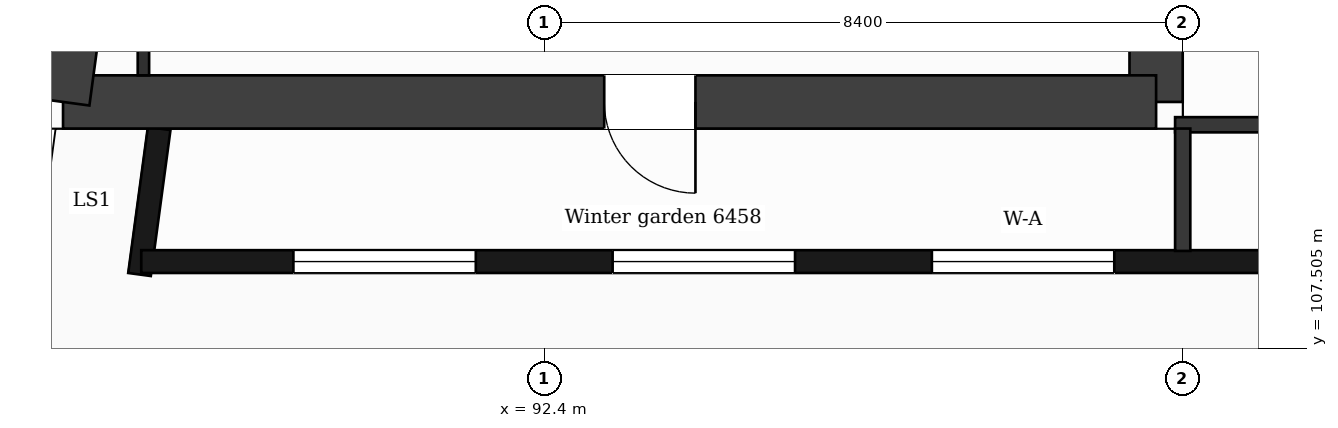
"""IFC4 building model, lengths in metres.
Left out: names, types, materials, properties, quantities, classifications, styles, units other than length and angle.
Written with IfcOpenShell. Run it as: python <this file> out.ifc"""

import sys

from ifc_helpers import new_model, si_unit, direction, frame, frame_2d, origin, place, context, subcontext, project, spatial, rectangle, extrude, element, fill, save


model = new_model("IFC4")
c1 = context("Model", 3, precision=1e-05, world=origin(), true_north=direction((0.0, 1.0)))
c2 = subcontext(c1, "Body", "Model", "MODEL_VIEW")
j1 = project(units=[si_unit("LENGTHUNIT", "METRE"), si_unit("PLANEANGLEUNIT", "RADIAN")], contexts=[c1])
p1 = place(None, origin())
s1 = spatial("IfcSite", under=j1, at=p1, CompositionType="ELEMENT")
p2 = place(p1, origin())
s2 = spatial("IfcBuilding", under=s1, at=p2, CompositionType="ELEMENT")
p3 = place(p2, frame((0.0, 0.0, 266.4)))
s3 = spatial("IfcBuildingStorey", under=s2, at=p3, CompositionType="ELEMENT", Elevation=266.4)
p4 = place(p3, frame((100.45, 132.05, 0.0), z_axis=(0.0, 0.0, 1.0), x_axis=(0.0, -1.0, 0.0)))
e1 = element("IfcWall", 1, at=p4, inside=s3, PredefinedType="SHEAR", context=c2, shape_type="SweptSolid", body=[
    extrude(rectangle(XDim=21.3, YDim=0.7, at=frame_2d((10.65, 0.0))), origin(), (0.0, 0.0, 1.0), 3.7),
])
p5 = place(p4, frame((7.9, 0.0, 0.0)))
e2 = element("IfcOpeningElement", 2, at=p5, cuts=e1, PredefinedType="OPENING", context=c2, shape_type="SweptSolid", body=[
    extrude(rectangle(XDim=1.4, YDim=2.1, at=frame_2d((0.7, 1.05))), frame((0.0, 0.36, 0.0), z_axis=(0.0, -1.0, 0.0), x_axis=(1.0, 0.0, 0.0)), (0.0, 0.0, 1.0), 0.72),
])
p6 = place(p3, frame((100.45, 110.75, 0.0), z_axis=(0.0, 0.0, 1.0), x_axis=(-1.0, 0.0, 0.0)))
e3 = element("IfcWall", 3, at=p6, inside=s3, PredefinedType="SHEAR", context=c2, shape_type="SweptSolid", body=[
    extrude(rectangle(XDim=14.38, YDim=0.7, at=frame_2d((7.19, 0.0))), origin(), (0.0, 0.0, 1.0), 3.7),
])
p7 = place(p6, frame((6.06, 0.0, 0.0)))
e4 = element("IfcOpeningElement", 4, at=p7, cuts=e3, PredefinedType="OPENING", context=c2, shape_type="SweptSolid", body=[
    extrude(rectangle(XDim=1.2, YDim=2.1, at=frame_2d((0.6, 1.05))), frame((0.0, 0.36, 0.0), z_axis=(0.0, -1.0, 0.0), x_axis=(1.0, 0.0, 0.0)), (0.0, 0.0, 1.0), 0.72),
])
p8 = place(p3, frame((86.07, 110.75, 0.0), z_axis=(0.0, 0.0, 1.0), x_axis=(0.133406218907, 0.991061441464, 0.0)))
e5 = element("IfcWall", 5, at=p8, inside=s3, PredefinedType="SHEAR", context=c2, shape_type="SweptSolid", body=[
    extrude(rectangle(XDim=21.492, YDim=0.7, at=frame_2d((10.746, 0.0))), origin(), (0.0, 0.0, 1.0), 3.7),
])
p9 = place(p3, frame((87.334, 110.4, 0.0), z_axis=(0.0, 0.0, 1.0), x_axis=(-0.13345962011, -0.991054251694, 0.0)))
e6 = element("IfcWall", 6, at=p9, inside=s3, PredefinedType="SOLIDWALL", context=c2, shape_type="SweptSolid", body=[
    extrude(rectangle(XDim=1.937, YDim=0.3, at=frame_2d((0.969, 0.0))), origin(), (0.0, 0.0, 1.0), 3.38),
])
p10 = place(p3, frame((87.099, 108.65, 0.0), z_axis=(0.0, 0.0, 1.0), x_axis=(1.0, 0.0, 0.0)))
e7 = element("IfcWall", 7, at=p10, inside=s3, PredefinedType="SOLIDWALL", context=c2, shape_type="SweptSolid", body=[
    extrude(rectangle(XDim=52.774, YDim=0.3, at=frame_2d((26.387, 0.0))), origin(), (0.0, 0.0, 1.0), 3.38),
])
p11 = place(p10, frame((2.001, 0.0, 0.9)))
e8 = element("IfcOpeningElement", 8, at=p11, cuts=e7, PredefinedType="OPENING", context=c2, shape_type="SweptSolid", body=[
    extrude(rectangle(XDim=2.4, YDim=2.1, at=frame_2d((1.2, 1.05))), frame((0.0, 0.16, 0.0), z_axis=(0.0, -1.0, 0.0), x_axis=(1.0, 0.0, 0.0)), (0.0, 0.0, 1.0), 0.32),
])
p12 = place(p10, frame((6.201, 0.0, 0.9)))
e9 = element("IfcOpeningElement", 9, at=p12, cuts=e7, PredefinedType="OPENING", context=c2, shape_type="SweptSolid", body=[
    extrude(rectangle(XDim=2.4, YDim=2.1, at=frame_2d((1.2, 1.05))), frame((0.0, 0.16, 0.0), z_axis=(0.0, -1.0, 0.0), x_axis=(1.0, 0.0, 0.0)), (0.0, 0.0, 1.0), 0.32),
])
p13 = place(p10, frame((10.401, 0.0, 0.9)))
e10 = element("IfcOpeningElement", 10, at=p13, cuts=e7, PredefinedType="OPENING", context=c2, shape_type="SweptSolid", body=[
    extrude(rectangle(XDim=2.4, YDim=2.1, at=frame_2d((1.2, 1.05))), frame((0.0, 0.16, 0.0), z_axis=(0.0, -1.0, 0.0), x_axis=(1.0, 0.0, 0.0)), (0.0, 0.0, 1.0), 0.32),
])
p14 = place(p10, frame((15.201, 0.0, 0.9)))
e11 = element("IfcOpeningElement", 11, at=p14, cuts=e7, PredefinedType="OPENING", context=c2, shape_type="SweptSolid", body=[
    extrude(rectangle(XDim=1.2, YDim=2.1, at=frame_2d((0.6, 1.05))), frame((0.0, 0.16, 0.0), z_axis=(0.0, -1.0, 0.0), x_axis=(1.0, 0.0, 0.0)), (0.0, 0.0, 1.0), 0.32),
])
p15 = place(p10, frame((19.401, 0.0, 0.9)))
e12 = element("IfcOpeningElement", 12, at=p15, cuts=e7, PredefinedType="OPENING", context=c2, shape_type="SweptSolid", body=[
    extrude(rectangle(XDim=1.2, YDim=2.1, at=frame_2d((0.6, 1.05))), frame((0.0, 0.16, 0.0), z_axis=(0.0, -1.0, 0.0), x_axis=(1.0, 0.0, 0.0)), (0.0, 0.0, 1.0), 0.32),
])
p16 = place(p10, frame((22.701, 0.0, 0.0)))
e13 = element("IfcOpeningElement", 13, at=p16, cuts=e7, PredefinedType="OPENING", context=c2, shape_type="SweptSolid", body=[
    extrude(rectangle(XDim=1.2, YDim=2.4, at=frame_2d((0.6, 1.2))), frame((0.0, 0.16, 0.0), z_axis=(0.0, -1.0, 0.0), x_axis=(1.0, 0.0, 0.0)), (0.0, 0.0, 1.0), 0.32),
])
p17 = place(p10, frame((24.501, 0.0, 0.9)))
e14 = element("IfcOpeningElement", 14, at=p17, cuts=e7, PredefinedType="OPENING", context=c2, shape_type="SweptSolid", body=[
    extrude(rectangle(XDim=1.2, YDim=2.1, at=frame_2d((0.6, 1.05))), frame((0.0, 0.16, 0.0), z_axis=(0.0, -1.0, 0.0), x_axis=(1.0, 0.0, 0.0)), (0.0, 0.0, 1.0), 0.32),
])
p18 = place(p10, frame((27.201, 0.0, 0.9)))
e15 = element("IfcOpeningElement", 15, at=p18, cuts=e7, PredefinedType="OPENING", context=c2, shape_type="SweptSolid", body=[
    extrude(rectangle(XDim=2.4, YDim=2.1, at=frame_2d((1.2, 1.05))), frame((0.0, 0.16, 0.0), z_axis=(0.0, -1.0, 0.0), x_axis=(1.0, 0.0, 0.0)), (0.0, 0.0, 1.0), 0.32),
])
p19 = place(p10, frame((31.102, 0.0, 0.0)))
e16 = element("IfcOpeningElement", 16, at=p19, cuts=e7, PredefinedType="OPENING", context=c2, shape_type="SweptSolid", body=[
    extrude(rectangle(XDim=1.2, YDim=2.4, at=frame_2d((0.6, 1.2))), frame((0.0, 0.16, 0.0), z_axis=(0.0, -1.0, 0.0), x_axis=(1.0, 0.0, 0.0)), (0.0, 0.0, 1.0), 0.32),
])
p20 = place(p10, frame((32.901, 0.0, 0.9)))
e17 = element("IfcOpeningElement", 17, at=p20, cuts=e7, PredefinedType="OPENING", context=c2, shape_type="SweptSolid", body=[
    extrude(rectangle(XDim=1.2, YDim=2.1, at=frame_2d((0.6, 1.05))), frame((0.0, 0.16, 0.0), z_axis=(0.0, -1.0, 0.0), x_axis=(1.0, 0.0, 0.0)), (0.0, 0.0, 1.0), 0.32),
])
p21 = place(p10, frame((35.602, 0.0, 0.9)))
e18 = element("IfcOpeningElement", 18, at=p21, cuts=e7, PredefinedType="OPENING", context=c2, shape_type="SweptSolid", body=[
    extrude(rectangle(XDim=2.4, YDim=2.1, at=frame_2d((1.2, 1.05))), frame((0.0, 0.16, 0.0), z_axis=(0.0, -1.0, 0.0), x_axis=(1.0, 0.0, 0.0)), (0.0, 0.0, 1.0), 0.32),
])
p22 = place(p10, frame((39.802, 0.0, 0.9)))
e19 = element("IfcOpeningElement", 19, at=p22, cuts=e7, PredefinedType="OPENING", context=c2, shape_type="SweptSolid", body=[
    extrude(rectangle(XDim=2.4, YDim=2.1, at=frame_2d((1.2, 1.05))), frame((0.0, 0.16, 0.0), z_axis=(0.0, -1.0, 0.0), x_axis=(1.0, 0.0, 0.0)), (0.0, 0.0, 1.0), 0.32),
])
p23 = place(p10, frame((44.602, 0.0, 0.9)))
e20 = element("IfcOpeningElement", 20, at=p23, cuts=e7, PredefinedType="OPENING", context=c2, shape_type="SweptSolid", body=[
    extrude(rectangle(XDim=1.2, YDim=2.1, at=frame_2d((0.6, 1.05))), frame((0.0, 0.16, 0.0), z_axis=(0.0, -1.0, 0.0), x_axis=(1.0, 0.0, 0.0)), (0.0, 0.0, 1.0), 0.32),
])
p24 = place(p10, frame((48.802, 0.0, 0.9)))
e21 = element("IfcOpeningElement", 21, at=p24, cuts=e7, PredefinedType="OPENING", context=c2, shape_type="SweptSolid", body=[
    extrude(rectangle(XDim=1.2, YDim=2.1, at=frame_2d((0.6, 1.05))), frame((0.0, 0.16, 0.0), z_axis=(0.0, -1.0, 0.0), x_axis=(1.0, 0.0, 0.0)), (0.0, 0.0, 1.0), 0.32),
])
p25 = place(p3, frame((100.7, 110.45, 0.0), z_axis=(0.0, 0.0, 1.0), x_axis=(1.0, 0.0, 0.0)))
e22 = element("IfcWall", 22, at=p25, inside=s3, PredefinedType="PARTITIONING", context=c2, shape_type="SweptSolid", body=[
    extrude(rectangle(XDim=25.4, YDim=0.2, at=frame_2d((12.7, 0.0))), origin(), (0.0, 0.0, 1.0), 3.38),
])
p26 = place(p3, frame((87.127, 111.1, 0.0), z_axis=(0.0, 0.0, 1.0), x_axis=(0.0, 1.0, 0.0)))
e23 = element("IfcWall", 23, at=p26, inside=s3, PredefinedType="PARTITIONING", context=c2, shape_type="SweptSolid", body=[
    extrude(rectangle(XDim=1.8, YDim=0.15, at=frame_2d((0.9, 0.0))), origin(), (0.0, 0.0, 1.0), 3.38),
])
p27 = place(p3, frame((100.8, 108.79, 0.0), z_axis=(0.0, 0.0, 1.0), x_axis=(0.0, 1.0, 0.0)))
e24 = element("IfcWall", 24, at=p27, inside=s3, PredefinedType="PARTITIONING", context=c2, shape_type="SweptSolid", body=[
    extrude(rectangle(XDim=1.61, YDim=0.2, at=frame_2d((0.805, 0.0))), origin(), (0.0, 0.0, 1.0), 3.38),
])
p28 = place(p11, origin())
e25 = element("IfcWindow", 25, at=p28, inside=s3, PartitioningType="SINGLE_PANEL", PredefinedType="WINDOW", context=c2, shape_type="SweptSolid", body=[
    extrude(rectangle(XDim=2.4, YDim=2.1, at=frame_2d((1.2, 1.05))), frame((0.0, 0.03, 0.0), z_axis=(0.0, -1.0, 0.0), x_axis=(1.0, 0.0, 0.0)), (0.0, 0.0, 1.0), 0.06),
])
fill(e8, e25)
p29 = place(p12, origin())
e26 = element("IfcWindow", 26, at=p29, inside=s3, PartitioningType="SINGLE_PANEL", PredefinedType="WINDOW", context=c2, shape_type="SweptSolid", body=[
    extrude(rectangle(XDim=2.4, YDim=2.1, at=frame_2d((1.2, 1.05))), frame((0.0, 0.03, 0.0), z_axis=(0.0, -1.0, 0.0), x_axis=(1.0, 0.0, 0.0)), (0.0, 0.0, 1.0), 0.06),
])
fill(e9, e26)
p30 = place(p13, origin())
e27 = element("IfcWindow", 27, at=p30, inside=s3, PartitioningType="SINGLE_PANEL", PredefinedType="WINDOW", context=c2, shape_type="SweptSolid", body=[
    extrude(rectangle(XDim=2.4, YDim=2.1, at=frame_2d((1.2, 1.05))), frame((0.0, 0.03, 0.0), z_axis=(0.0, -1.0, 0.0), x_axis=(1.0, 0.0, 0.0)), (0.0, 0.0, 1.0), 0.06),
])
fill(e10, e27)
p31 = place(p7, origin())
e28 = element("IfcDoor", 28, at=p31, inside=s3, OperationType="SINGLE_SWING_LEFT", PredefinedType="DOOR", context=c2, shape_type="SweptSolid", body=[
    extrude(rectangle(XDim=1.2, YDim=2.1, at=frame_2d((0.6, 1.05))), frame((0.0, 0.025, 0.0), z_axis=(0.0, -1.0, 0.0), x_axis=(1.0, 0.0, 0.0)), (0.0, 0.0, 1.0), 0.05),
])
fill(e4, e28)
save(model, sys.argv[1])
